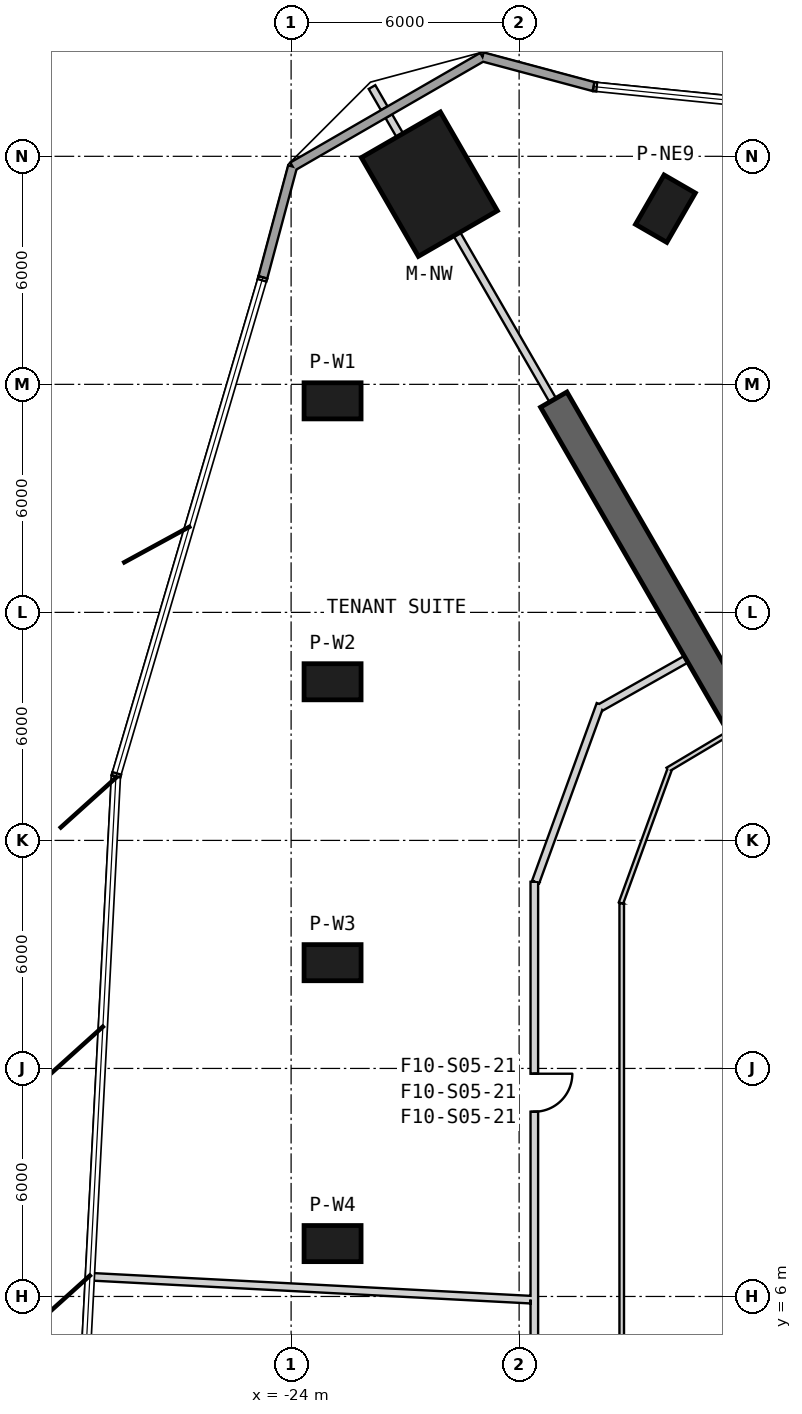
"""IFC4 building model, lengths in metres.
Left out: names, types, materials, properties, quantities, classifications, styles, units other than length and angle.
Written with IfcOpenShell. Run it as: python <this file> out.ifc"""

import sys

from ifc_helpers import new_model, si_unit, direction, frame, frame_2d, origin, origin_2d, place, context, subcontext, project, spatial, rectangle, extrude, element, fill, save


model = new_model("IFC4")
c1 = context("Model", 3, precision=1e-05, world=origin(), true_north=direction((0.0, 1.0)))
c2 = subcontext(c1, "Body", "Model", "MODEL_VIEW")
j1 = project(units=[si_unit("LENGTHUNIT", "METRE"), si_unit("PLANEANGLEUNIT", "RADIAN")], contexts=[c1])
p1 = place(None, origin())
s1 = spatial("IfcSite", under=j1, at=p1, CompositionType="ELEMENT")
p2 = place(p1, origin())
s2 = spatial("IfcBuilding", under=s1, at=p2, CompositionType="ELEMENT")
p3 = place(p2, frame((0.0, 0.0, 107.0)))
s3 = spatial("IfcBuildingStorey", under=s2, at=p3, CompositionType="ELEMENT", Elevation=107.0)
p4 = place(p3, frame((-20.362, 35.267, 0.0), z_axis=(0.0, 0.0, 1.0), x_axis=(-0.5, 0.866025403784, 0.0)))
e1 = element("IfcColumn", 1, at=p4, inside=s3, PredefinedType="COLUMN", context=c2, shape_type="SweptSolid", body=[
    extrude(rectangle(XDim=3.0, YDim=2.4, at=origin_2d()), origin(), (0.0, 0.0, 1.0), 4.1),
])
for number, where, z_axis, x_axis in (
    (2, (-22.909, 29.566, 0.0), (0.0, 0.0, 1.0), (-1.0, 0.0, 0.0)),
    (3, (-22.909, 22.174, 0.0), (0.0, 0.0, 1.0), (-1.0, 0.0, 0.0)),
    (4, (-22.909, 14.783, 0.0), (0.0, 0.0, 1.0), (-1.0, 0.0, 0.0)),
    (5, (-22.909, 7.391, 0.0), (0.0, 0.0, 1.0), (-1.0, 0.0, 0.0)),
    (6, (-14.15, 34.623, 0.0), (0.0, 0.0, 1.0), (0.5, 0.866, 0.0)),
):
    element("IfcColumn", number, at=place(p3, frame(where, z_axis=z_axis, x_axis=x_axis)), inside=s3, PredefinedType="COLUMN", context=c2, shape_type="SweptSolid", body=[
        extrude(rectangle(XDim=1.5, YDim=0.95, at=origin_2d()), origin(), (0.0, 0.0, 1.0), 4.1),
    ])
p5 = place(p3, frame((-10.575, 18.316, 0.0), z_axis=(0.0, 0.0, 1.0), x_axis=(-0.500003112169, 0.866023606965, 0.0)))
e7 = element("IfcWall", 7, at=p5, inside=s3, PredefinedType="SHEAR", context=c2, shape_type="SweptSolid", body=[
    extrude(rectangle(XDim=13.027, YDim=0.8, at=frame_2d((6.513, 0.0))), origin(), (0.0, 0.0, 1.0), 4.1),
])
p6 = place(p5, frame((1.3, 0.0, 0.0)))
e8 = element("IfcOpeningElement", 8, at=p6, cuts=e7, PredefinedType="OPENING", context=c2, shape_type="SweptSolid", body=[
    extrude(rectangle(XDim=1.4, YDim=2.4, at=frame_2d((0.7, 1.2))), frame((0.0, 0.41, 0.0), z_axis=(0.0, -1.0, 0.0), x_axis=(1.0, 0.0, 0.0)), (0.0, 0.0, 1.0), 0.82),
])
p7 = place(p3, frame((-16.038, 37.833, 0.0), z_axis=(0.0, 0.0, 1.0), x_axis=(-0.965933302526, 0.258791141795, 0.0)))
e9 = element("IfcWall", 9, at=p7, inside=s3, PredefinedType="SOLIDWALL", context=c2, shape_type="SweptSolid", body=[
    extrude(rectangle(XDim=3.029, YDim=0.24, at=frame_2d((1.515, 0.0))), origin(), (0.0, 0.0, 1.0), 3.8),
])
p8 = place(p3, frame((-18.964, 38.617, 0.0), z_axis=(0.0, 0.0, 1.0), x_axis=(-0.866013679419, -0.500020306647, 0.0)))
e10 = element("IfcWall", 10, at=p8, inside=s3, PredefinedType="SOLIDWALL", context=c2, shape_type="SweptSolid", body=[
    extrude(rectangle(XDim=5.771, YDim=0.24, at=frame_2d((2.885, 0.0))), origin(), (0.0, 0.0, 1.0), 3.8),
])
p9 = place(p3, frame((-23.962, 35.732, 0.0), z_axis=(0.0, 0.0, 1.0), x_axis=(-0.258799378192, -0.965931095807, 0.0)))
e11 = element("IfcWall", 11, at=p9, inside=s3, PredefinedType="SOLIDWALL", context=c2, shape_type="SweptSolid", body=[
    extrude(rectangle(XDim=3.021, YDim=0.24, at=frame_2d((1.51, 0.0))), origin(), (0.0, 0.0, 1.0), 3.8),
])
p10 = place(p3, frame((-12.482, 20.819, 0.0), z_axis=(0.0, 0.0, 1.0), x_axis=(-0.85913200524, -0.511754040113, 0.0)))
e12 = element("IfcWall", 12, at=p10, inside=s3, PredefinedType="PARTITIONING", context=c2, shape_type="SweptSolid", body=[
    extrude(rectangle(XDim=1.875, YDim=0.12, at=frame_2d((0.937, 0.0))), origin(), (0.0, 0.0, 1.0), 3.8),
])
p11 = place(p3, frame((-14.038, 19.872, 0.0), z_axis=(0.0, 0.0, 1.0), x_axis=(-0.342035870777, -0.939686896313, 0.0)))
e13 = element("IfcWall", 13, at=p11, inside=s3, PredefinedType="PARTITIONING", context=c2, shape_type="SweptSolid", body=[
    extrude(rectangle(XDim=3.749, YDim=0.12, at=frame_2d((1.875, 0.0))), origin(), (0.0, 0.0, 1.0), 2.88),
])
p12 = place(p3, frame((-15.3, 16.345, 0.0), z_axis=(0.0, 0.0, 1.0), x_axis=(0.0, -1.0, 0.0)))
e14 = element("IfcWall", 14, at=p12, inside=s3, PredefinedType="PARTITIONING", context=c2, shape_type="SweptSolid", body=[
    extrude(rectangle(XDim=32.811, YDim=0.12, at=frame_2d((16.405, 0.0))), origin(), (0.0, 0.0, 1.0), 2.98),
])
p13 = place(p12, frame((15.875, 0.0, 0.0)))
e15 = element("IfcOpeningElement", 15, at=p13, cuts=e14, PredefinedType="OPENING", context=c2, shape_type="SweptSolid", body=[
    extrude(rectangle(XDim=1.0, YDim=2.1, at=frame_2d((0.5, 1.05))), frame((0.0, 0.07, 0.0), z_axis=(0.0, -1.0, 0.0), x_axis=(1.0, 0.0, 0.0)), (0.0, 0.0, 1.0), 0.14),
])
p14 = place(p3, frame((-17.6, 16.911, 0.0), z_axis=(0.0, 0.0, 1.0), x_axis=(0.0, -1.0, 0.0)))
e16 = element("IfcWall", 16, at=p14, inside=s3, PredefinedType="PARTITIONING", context=c2, shape_type="SweptSolid", body=[
    extrude(rectangle(XDim=11.022, YDim=0.2, at=frame_2d((5.511, 0.0))), origin(), (0.0, 0.0, 1.0), 2.98),
])
p15 = place(p14, frame((5.05, 0.0, 0.0)))
e17 = element("IfcOpeningElement", 17, at=p15, cuts=e16, PredefinedType="OPENING", context=c2, shape_type="SweptSolid", body=[
    extrude(rectangle(XDim=1.0, YDim=2.1, at=frame_2d((0.5, 1.05))), frame((0.0, 0.11, 0.0), z_axis=(0.0, -1.0, 0.0), x_axis=(1.0, 0.0, 0.0)), (0.0, 0.0, 1.0), 0.22),
])
p16 = place(p3, frame((-17.6, 5.888, 0.0), z_axis=(0.0, 0.0, 1.0), x_axis=(0.0, -1.0, 0.0)))
e18 = element("IfcWall", 18, at=p16, inside=s3, PredefinedType="PARTITIONING", context=c2, shape_type="SweptSolid", body=[
    extrude(rectangle(XDim=16.018, YDim=0.2, at=frame_2d((8.009, 0.0))), origin(), (0.0, 0.0, 1.0), 3.08),
])
p17 = place(p16, frame((7.509, 0.0, 0.0)))
e19 = element("IfcOpeningElement", 19, at=p17, cuts=e18, PredefinedType="OPENING", context=c2, shape_type="SweptSolid", body=[
    extrude(rectangle(XDim=1.0, YDim=2.1, at=frame_2d((0.5, 1.05))), frame((0.0, 0.11, 0.0), z_axis=(0.0, -1.0, 0.0), x_axis=(1.0, 0.0, 0.0)), (0.0, 0.0, 1.0), 0.22),
])
p18 = place(p3, frame((-15.864, 21.581, 0.0), z_axis=(0.0, 0.0, 1.0), x_axis=(-0.342030631204, -0.939688803444, 0.0)))
e20 = element("IfcWall", 20, at=p18, inside=s3, PredefinedType="PARTITIONING", context=c2, shape_type="SweptSolid", body=[
    extrude(rectangle(XDim=4.976, YDim=0.2, at=frame_2d((2.488, 0.0))), origin(), (0.0, 0.0, 1.0), 2.88),
])
p19 = place(p3, frame((-13.606, 22.767, 0.0), z_axis=(0.0, 0.0, 1.0), x_axis=(-0.870922595713, -0.491420219645, 0.0)))
e21 = element("IfcWall", 21, at=p19, inside=s3, PredefinedType="PARTITIONING", context=c2, shape_type="SweptSolid", body=[
    extrude(rectangle(XDim=2.589, YDim=0.2, at=frame_2d((1.295, 0.0))), origin(), (0.0, 0.0, 1.0), 3.8),
])
p20 = place(p3, frame((-17.7, 5.916, 0.0), z_axis=(0.0, 0.0, 1.0), x_axis=(-0.998647121722, 0.051999291111, 0.0)))
e22 = element("IfcWall", 22, at=p20, inside=s3, PredefinedType="PARTITIONING", context=c2, shape_type="SweptSolid", body=[
    extrude(rectangle(XDim=11.611, YDim=0.2, at=frame_2d((5.805, 0.0))), origin(), (0.0, 0.0, 1.0), 3.08),
])
p21 = place(p3, frame((-21.871, 37.822, 0.0), z_axis=(0.0, 0.0, 1.0), x_axis=(0.500006411147, -0.866021702275, 0.0)))
e23 = element("IfcWall", 23, at=p21, inside=s3, PredefinedType="PARTITIONING", context=c2, shape_type="SweptSolid", body=[
    extrude(rectangle(XDim=0.645, YDim=0.2, at=frame_2d((0.323, 0.0))), origin(), (0.0, 0.0, 1.0), 3.8),
])
p22 = place(p3, frame((-21.429, 37.056, 0.0), z_axis=(0.0, 0.0, 1.0), x_axis=(0.500193841991, -0.86591346013, 0.0)))
e24 = element("IfcWall", 24, at=p22, inside=s3, PredefinedType="PARTITIONING", context=c2, shape_type="SweptSolid", body=[
    extrude(rectangle(XDim=0.583, YDim=0.2, at=frame_2d((0.292, 0.0))), origin(), (0.0, 0.0, 1.0), 3.8),
])
p23 = place(p3, frame((-19.637, 33.953, 0.0), z_axis=(0.0, 0.0, 1.0), x_axis=(0.499994660107, -0.866028486751, 0.0)))
e25 = element("IfcWall", 25, at=p23, inside=s3, PredefinedType="PARTITIONING", context=c2, shape_type="SweptSolid", body=[
    extrude(rectangle(XDim=5.046, YDim=0.2, at=frame_2d((2.523, 0.0))), origin(), (0.0, 0.0, 1.0), 3.37),
])
p24 = place(p15, origin())
e26 = element("IfcDoor", 26, at=p24, inside=s3, OperationType="SINGLE_SWING_LEFT", PredefinedType="USERDEFINED", context=c2, shape_type="SweptSolid", body=[
    extrude(rectangle(XDim=1.0, YDim=2.1, at=frame_2d((0.5, 1.05))), frame((0.0, 0.025, 0.0), z_axis=(0.0, -1.0, 0.0), x_axis=(1.0, 0.0, 0.0)), (0.0, 0.0, 1.0), 0.05),
])
fill(e17, e26)
save(model, sys.argv[1])
